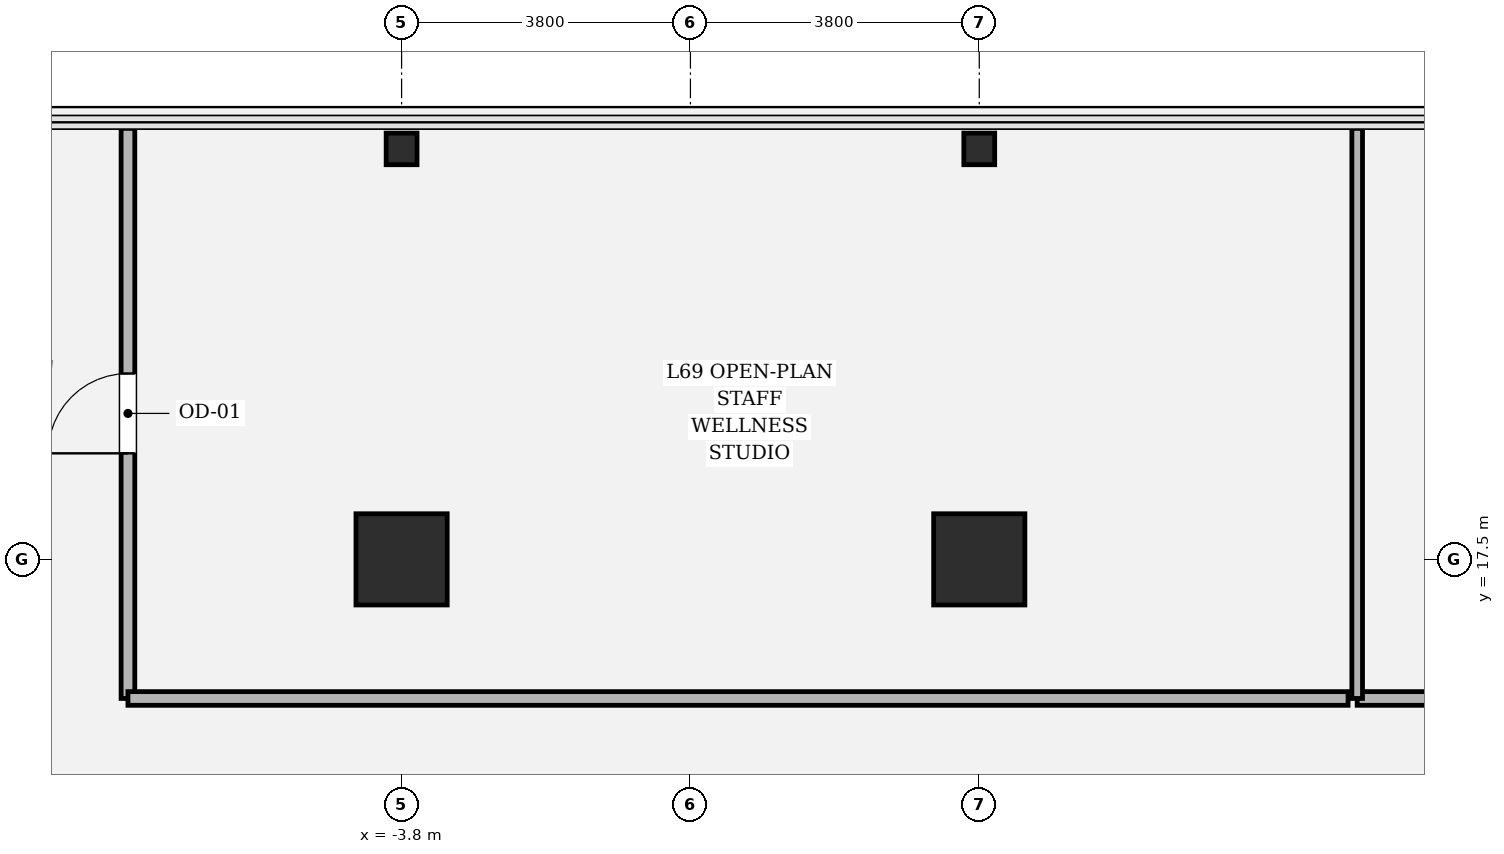
"""IFC4 building model, lengths in metres.
Left out: names, types, materials, properties, quantities, classifications, styles, units other than length and angle.
Written with IfcOpenShell. Run it as: python <this file> out.ifc"""

import sys

from ifc_helpers import new_model, si_unit, direction, frame, frame_2d, origin, origin_2d, place, context, subcontext, project, spatial, rectangle, hollow_rectangle, i_section, extrude, element, fill, save


model = new_model("IFC4")
c1 = context("Model", 3, precision=1e-05, world=origin(), true_north=direction((0.0, 1.0)))
c2 = subcontext(c1, "Body", "Model", "MODEL_VIEW")
j1 = project(units=[si_unit("LENGTHUNIT", "METRE"), si_unit("PLANEANGLEUNIT", "RADIAN")], contexts=[c1])
p1 = place(None, origin())
s1 = spatial("IfcSite", under=j1, at=p1, CompositionType="ELEMENT")
p2 = place(p1, origin())
s2 = spatial("IfcBuilding", under=s1, at=p2, CompositionType="ELEMENT")
p3 = place(p2, frame((0.0, 0.0, 292.2)))
s3 = spatial("IfcBuildingStorey", under=s2, at=p3, CompositionType="ELEMENT", Elevation=292.2)
for number, where, z_axis, x_axis in (
    (1, (3.8, 17.5, 0.0), (0.0, 0.0, 1.0), (1.0, 0.0, 0.0)),
    (2, (-3.8, 17.5, 0.0), (0.0, 0.0, 1.0), (1.0, 0.0, 0.0)),
):
    element("IfcColumn", number, at=place(p3, frame(where, z_axis=z_axis, x_axis=x_axis)), inside=s3, PredefinedType="COLUMN", context=c2, shape_type="SweptSolid", body=[
        extrude(hollow_rectangle(XDim=1.2, YDim=1.2, WallThickness=0.035, at=origin_2d()), origin(), (0.0, 0.0, 1.0), 4.2),
    ])
for number, where, z_axis, x_axis in (
    (3, (-3.8, 22.9, 0.0), (0.0, 0.0, 1.0), (1.0, 0.0, 0.0)),
    (4, (3.8, 22.9, 0.0), (0.0, 0.0, 1.0), (1.0, 0.0, 0.0)),
):
    element("IfcColumn", number, at=place(p3, frame(where, z_axis=z_axis, x_axis=x_axis)), inside=s3, PredefinedType="COLUMN", context=c2, shape_type="SweptSolid", body=[
        extrude(i_section(OverallWidth=0.406, OverallDepth=0.416, WebThickness=0.029, FlangeThickness=0.048, FilletRadius=0.018, at=origin_2d()), origin(), (0.0, 0.0, 1.0), 4.198),
    ])
p4 = place(p3, frame((12.77, 15.67, 0.0), z_axis=(0.0, 0.0, 1.0), x_axis=(-1.0, 0.0, 0.0)))
e5 = element("IfcWall", 5, at=p4, inside=s3, PredefinedType="PARTITIONING", context=c2, shape_type="SweptSolid", body=[
    extrude(rectangle(XDim=3.998, YDim=0.18, at=frame_2d((1.999, 0.0))), origin(), (0.0, 0.0, 1.0), 3.394),
])
p5 = place(p4, frame((1.474, 0.0, 0.0)))
e6 = element("IfcOpeningElement", 6, at=p5, cuts=e5, PredefinedType="OPENING", context=c2, shape_type="SweptSolid", body=[
    extrude(rectangle(XDim=1.05, YDim=2.2, at=frame_2d((0.525, 1.1))), frame((0.0, 0.1, 0.0), z_axis=(0.0, -1.0, 0.0), x_axis=(1.0, 0.0, 0.0)), (0.0, 0.0, 1.0), 0.2),
])
p6 = place(p3, frame((8.772, 15.67, 0.0), z_axis=(0.0, 0.0, 1.0), x_axis=(0.0, 1.0, 0.0)))
e7 = element("IfcWall", 7, at=p6, inside=s3, PredefinedType="PARTITIONING", context=c2, shape_type="SweptSolid", body=[
    extrude(rectangle(XDim=7.5, YDim=0.14, at=frame_2d((3.75, 0.0))), origin(), (0.0, 0.0, 1.0), 2.714),
])
p7 = place(p3, frame((-7.4, 15.67, 0.0), z_axis=(0.0, 0.0, 1.0), x_axis=(0.0, 1.0, 0.0)))
e8 = element("IfcWall", 8, at=p7, inside=s3, PredefinedType="PARTITIONING", context=c2, shape_type="SweptSolid", body=[
    extrude(rectangle(XDim=7.5, YDim=0.18, at=frame_2d((3.75, 0.0))), origin(), (0.0, 0.0, 1.0), 2.714),
])
p8 = place(p7, frame((3.225, 0.0, 0.0)))
e9 = element("IfcOpeningElement", 9, at=p8, cuts=e8, PredefinedType="OPENING", context=c2, shape_type="SweptSolid", body=[
    extrude(rectangle(XDim=1.05, YDim=2.2, at=frame_2d((0.525, 1.1))), frame((0.0, 0.1, 0.0), z_axis=(0.0, -1.0, 0.0), x_axis=(1.0, 0.0, 0.0)), (0.0, 0.0, 1.0), 0.2),
])
p9 = place(p3, frame((8.652, 15.67, 0.0), z_axis=(0.0, 0.0, 1.0), x_axis=(-1.0, 0.0, 0.0)))
e10 = element("IfcWall", 10, at=p9, inside=s3, PredefinedType="PARTITIONING", context=c2, shape_type="SweptSolid", body=[
    extrude(rectangle(XDim=16.052, YDim=0.18, at=frame_2d((8.026, 0.0))), origin(), (0.0, 0.0, 1.0), 3.394),
])
p10 = place(p8, origin())
e11 = element("IfcDoor", 11, at=p10, inside=s3, OperationType="SINGLE_SWING_LEFT", PredefinedType="DOOR", context=c2, shape_type="SweptSolid", body=[
    extrude(rectangle(XDim=1.05, YDim=2.2, at=frame_2d((0.525, 1.1))), frame((0.0, 0.025, 0.0), z_axis=(0.0, -1.0, 0.0), x_axis=(1.0, 0.0, 0.0)), (0.0, 0.0, 1.0), 0.05),
])
fill(e9, e11)
save(model, sys.argv[1])
